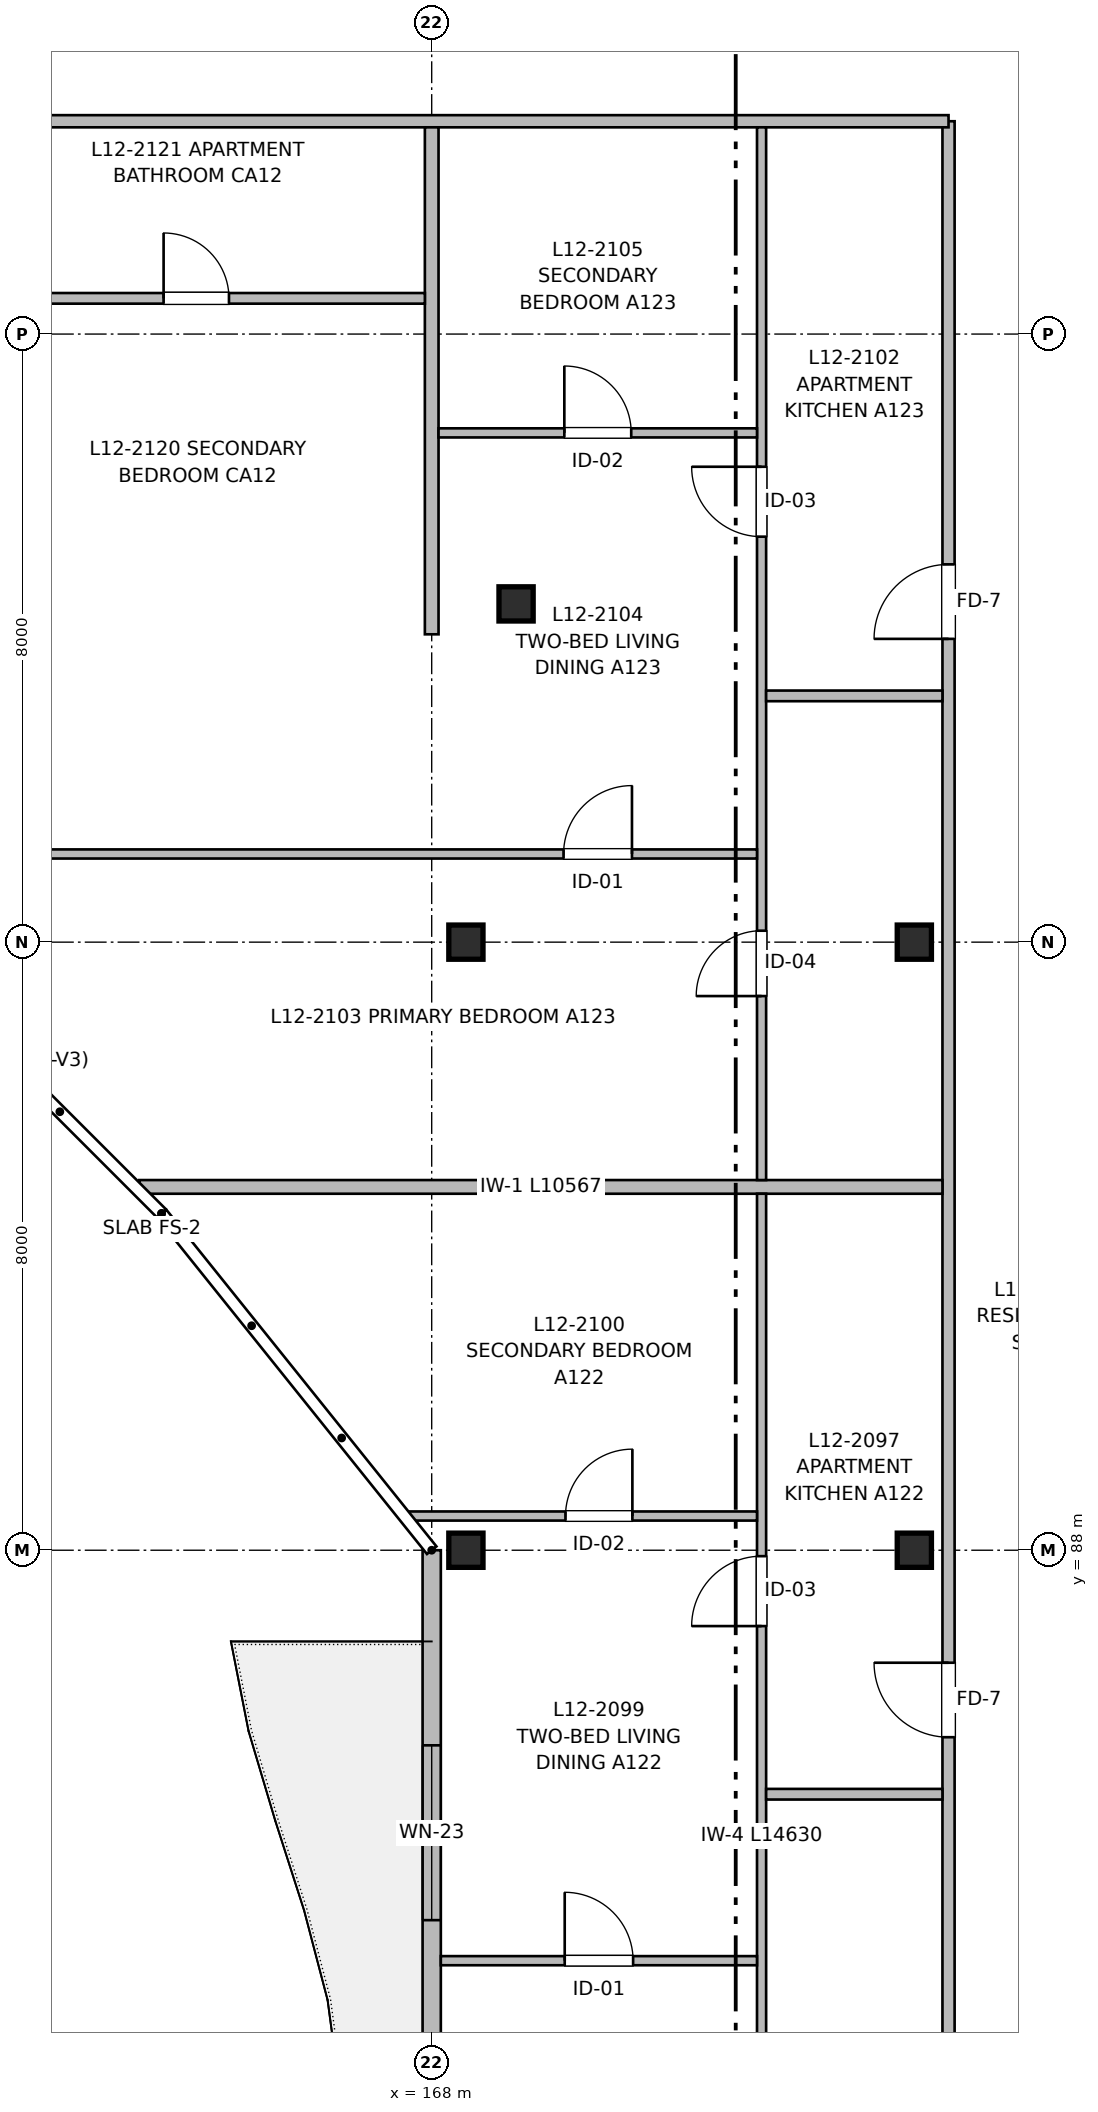
"""IFC4 building model, lengths in metres.
Left out: names, types, materials, properties, quantities, classifications, styles, units other than length and angle.
Written with IfcOpenShell. Run it as: python <this file> out.ifc"""

import sys

from ifc_helpers import new_model, si_unit, direction, frame, frame_2d, origin, origin_2d, place, context, subcontext, project, spatial, rectangle, extrude, element, fill, save


model = new_model("IFC4")
c1 = context("Model", 3, precision=1e-05, world=origin(), true_north=direction((0.0, 1.0)))
c2 = subcontext(c1, "Body", "Model", "MODEL_VIEW")
j1 = project(units=[si_unit("LENGTHUNIT", "METRE"), si_unit("PLANEANGLEUNIT", "RADIAN")], contexts=[c1])
p1 = place(None, origin())
s1 = spatial("IfcSite", under=j1, at=p1, CompositionType="ELEMENT")
p2 = place(p1, origin())
s2 = spatial("IfcBuilding", under=s1, at=p2, CompositionType="ELEMENT")
p3 = place(p2, frame((0.0, 0.0, 39.36)))
s3 = spatial("IfcBuildingStorey", under=s2, at=p3, CompositionType="ELEMENT", Elevation=39.36)
for number, where, z_axis, x_axis in (
    (1, (168.45, 88.0, 0.0), (0.0, 0.0, 1.0), (1.0, 0.0, 0.0)),
    (2, (168.45, 96.0, 0.0), (0.0, 0.0, 1.0), (1.0, 0.0, 0.0)),
    (3, (169.11, 100.45, 0.0), (0.0, 0.0, 1.0), (1.0, 0.0, 0.0)),
    (4, (174.35, 88.0, 0.0), (0.0, 0.0, 1.0), (1.0, 0.0, 0.0)),
    (5, (174.35, 96.0, 0.0), (0.0, 0.0, 1.0), (1.0, 0.0, 0.0)),
):
    element("IfcColumn", number, at=place(p3, frame(where, z_axis=z_axis, x_axis=x_axis)), inside=s3, PredefinedType="COLUMN", context=c2, shape_type="SweptSolid", body=[
        extrude(rectangle(XDim=0.45, YDim=0.45, at=origin_2d()), origin(), (0.0, 0.0, 1.0), 3.2),
    ])
p4 = place(p3, frame((168.0, 63.0, 0.0), z_axis=(0.0, 0.0, 1.0), x_axis=(0.0, 1.0, 0.0)))
e6 = element("IfcWall", 6, at=p4, inside=s3, PredefinedType="SOLIDWALL", context=c2, shape_type="SweptSolid", body=[
    extrude(rectangle(XDim=25.0, YDim=0.24, at=frame_2d((12.5, 0.0))), origin(), (0.0, 0.0, 1.0), 2.98),
])
p5 = place(p4, frame((3.567, 0.0, 0.0)))
e7 = element("IfcOpeningElement", 7, at=p5, cuts=e6, PredefinedType="OPENING", context=c2, shape_type="SweptSolid", body=[
    extrude(rectangle(XDim=1.2, YDim=2.2, at=frame_2d((0.6, 1.1))), frame((0.0, 0.13, 0.0), z_axis=(0.0, -1.0, 0.0), x_axis=(1.0, 0.0, 0.0)), (0.0, 0.0, 1.0), 0.26),
])
p6 = place(p4, frame((5.467, 0.0, 0.72)))
e8 = element("IfcOpeningElement", 8, at=p6, cuts=e6, PredefinedType="OPENING", context=c2, shape_type="SweptSolid", body=[
    extrude(rectangle(XDim=2.25, YDim=1.5, at=frame_2d((1.125, 0.75))), frame((0.0, 0.13, 0.0), z_axis=(0.0, -1.0, 0.0), x_axis=(1.0, 0.0, 0.0)), (0.0, 0.0, 1.0), 0.26),
])
p7 = place(p4, frame((11.65, 0.0, 0.72)))
e9 = element("IfcOpeningElement", 9, at=p7, cuts=e6, PredefinedType="OPENING", context=c2, shape_type="SweptSolid", body=[
    extrude(rectangle(XDim=1.7, YDim=1.5, at=frame_2d((0.85, 0.75))), frame((0.0, 0.13, 0.0), z_axis=(0.0, -1.0, 0.0), x_axis=(1.0, 0.0, 0.0)), (0.0, 0.0, 1.0), 0.26),
])
p8 = place(p4, frame((20.133, 0.0, 0.57)))
e10 = element("IfcOpeningElement", 10, at=p8, cuts=e6, PredefinedType="OPENING", context=c2, shape_type="SweptSolid", body=[
    extrude(rectangle(XDim=2.3, YDim=1.65, at=frame_2d((1.15, 0.825))), frame((0.0, 0.13, 0.0), z_axis=(0.0, -1.0, 0.0), x_axis=(1.0, 0.0, 0.0)), (0.0, 0.0, 1.0), 0.26),
])
p9 = place(p4, frame((16.555, 0.0, 0.82)))
e11 = element("IfcOpeningElement", 11, at=p9, cuts=e6, PredefinedType="OPENING", context=c2, shape_type="SweptSolid", body=[
    extrude(rectangle(XDim=1.5, YDim=1.4, at=frame_2d((0.75, 0.7))), frame((0.0, 0.13, 0.0), z_axis=(0.0, -1.0, 0.0), x_axis=(1.0, 0.0, 0.0)), (0.0, 0.0, 1.0), 0.26),
])
p10 = place(p3, frame((174.8, 63.16, 0.0), z_axis=(0.0, 0.0, 1.0), x_axis=(0.0, 1.0, 0.0)))
e12 = element("IfcWall", 12, at=p10, inside=s3, PredefinedType="PARTITIONING", context=c2, shape_type="SweptSolid", body=[
    extrude(rectangle(XDim=43.64, YDim=0.16, at=frame_2d((21.82, 0.0))), origin(), (0.0, 0.0, 1.0), 2.935),
])
p11 = place(p10, frame((6.61, 0.0, 0.0)))
e13 = element("IfcOpeningElement", 13, at=p11, cuts=e12, PredefinedType="OPENING", context=c2, shape_type="SweptSolid", body=[
    extrude(rectangle(XDim=1.5, YDim=2.2, at=frame_2d((0.75, 1.1))), frame((0.0, 0.09, 0.0), z_axis=(0.0, -1.0, 0.0), x_axis=(1.0, 0.0, 0.0)), (0.0, 0.0, 1.0), 0.18),
])
p12 = place(p10, frame((22.38, 0.0, 0.0)))
e14 = element("IfcOpeningElement", 14, at=p12, cuts=e12, PredefinedType="OPENING", context=c2, shape_type="SweptSolid", body=[
    extrude(rectangle(XDim=0.98, YDim=2.15, at=frame_2d((0.49, 1.075))), frame((0.0, 0.09, 0.0), z_axis=(0.0, -1.0, 0.0), x_axis=(1.0, 0.0, 0.0)), (0.0, 0.0, 1.0), 0.18),
])
p13 = place(p10, frame((36.83, 0.0, 0.0)))
e15 = element("IfcOpeningElement", 15, at=p13, cuts=e12, PredefinedType="OPENING", context=c2, shape_type="SweptSolid", body=[
    extrude(rectangle(XDim=0.98, YDim=2.15, at=frame_2d((0.49, 1.075))), frame((0.0, 0.09, 0.0), z_axis=(0.0, -1.0, 0.0), x_axis=(1.0, 0.0, 0.0)), (0.0, 0.0, 1.0), 0.18),
])
p14 = place(p3, frame((147.16, 106.8, 0.0), z_axis=(0.0, 0.0, 1.0), x_axis=(1.0, 0.0, 0.0)))
e16 = element("IfcWall", 16, at=p14, inside=s3, PredefinedType="PARTITIONING", context=c2, shape_type="SweptSolid", body=[
    extrude(rectangle(XDim=27.64, YDim=0.16, at=frame_2d((13.82, 0.0))), origin(), (0.0, 0.0, 1.0), 2.935),
])
p15 = place(p14, frame((3.515, 0.0, 0.0)))
e17 = element("IfcOpeningElement", 17, at=p15, cuts=e16, PredefinedType="OPENING", context=c2, shape_type="SweptSolid", body=[
    extrude(rectangle(XDim=1.05, YDim=2.15, at=frame_2d((0.525, 1.075))), frame((0.0, 0.09, 0.0), z_axis=(0.0, -1.0, 0.0), x_axis=(1.0, 0.0, 0.0)), (0.0, 0.0, 1.0), 0.18),
])
p16 = place(p14, frame((10.69, 0.0, 0.0)))
e18 = element("IfcOpeningElement", 18, at=p16, cuts=e16, PredefinedType="OPENING", context=c2, shape_type="SweptSolid", body=[
    extrude(rectangle(XDim=0.98, YDim=2.15, at=frame_2d((0.49, 1.075))), frame((0.0, 0.09, 0.0), z_axis=(0.0, -1.0, 0.0), x_axis=(1.0, 0.0, 0.0)), (0.0, 0.0, 1.0), 0.18),
])
p17 = place(p3, frame((168.0, 100.05, 0.0), z_axis=(0.0, 0.0, 1.0), x_axis=(0.0, 1.0, 0.0)))
e19 = element("IfcWall", 19, at=p17, inside=s3, PredefinedType="PARTITIONING", context=c2, shape_type="SweptSolid", body=[
    extrude(rectangle(XDim=6.67, YDim=0.18, at=frame_2d((3.335, 0.0))), origin(), (0.0, 0.0, 1.0), 2.935),
])
p18 = place(p3, frame((164.153, 92.78, 0.0), z_axis=(0.0, 0.0, 1.0), x_axis=(1.0, 0.0, 0.0)))
e20 = element("IfcWall", 20, at=p18, inside=s3, PredefinedType="PARTITIONING", context=c2, shape_type="SweptSolid", body=[
    extrude(rectangle(XDim=10.567, YDim=0.18, at=frame_2d((5.284, 0.0))), origin(), (0.0, 0.0, 1.0), 2.935),
])
p19 = place(p3, frame((172.34, 78.06, 0.0), z_axis=(0.0, 0.0, 1.0), x_axis=(0.0, 1.0, 0.0)))
e21 = element("IfcWall", 21, at=p19, inside=s3, PredefinedType="PARTITIONING", context=c2, shape_type="SweptSolid", body=[
    extrude(rectangle(XDim=14.63, YDim=0.12, at=frame_2d((7.315, 0.0))), origin(), (0.0, 0.0, 1.0), 2.935),
])
p20 = place(p19, frame((2.557, 0.0, 0.0)))
e22 = element("IfcOpeningElement", 22, at=p20, cuts=e21, PredefinedType="OPENING", context=c2, shape_type="SweptSolid", body=[
    extrude(rectangle(XDim=0.86, YDim=2.1, at=frame_2d((0.43, 1.05))), frame((0.0, 0.07, 0.0), z_axis=(0.0, -1.0, 0.0), x_axis=(1.0, 0.0, 0.0)), (0.0, 0.0, 1.0), 0.14),
])
p21 = place(p19, frame((8.942, 0.0, 0.0)))
e23 = element("IfcOpeningElement", 23, at=p21, cuts=e21, PredefinedType="OPENING", context=c2, shape_type="SweptSolid", body=[
    extrude(rectangle(XDim=0.92, YDim=2.1, at=frame_2d((0.46, 1.05))), frame((0.0, 0.07, 0.0), z_axis=(0.0, -1.0, 0.0), x_axis=(1.0, 0.0, 0.0)), (0.0, 0.0, 1.0), 0.14),
])
p22 = place(p3, frame((172.4, 84.79, 0.0), z_axis=(0.0, 0.0, 1.0), x_axis=(1.0, 0.0, 0.0)))
e24 = element("IfcWall", 24, at=p22, inside=s3, PredefinedType="PARTITIONING", context=c2, shape_type="SweptSolid", body=[
    extrude(rectangle(XDim=2.32, YDim=0.14, at=frame_2d((1.16, 0.0))), origin(), (0.0, 0.0, 1.0), 2.935),
])
p23 = place(p3, frame((168.12, 82.6, 0.0), z_axis=(0.0, 0.0, 1.0), x_axis=(1.0, 0.0, 0.0)))
e25 = element("IfcWall", 25, at=p23, inside=s3, PredefinedType="PARTITIONING", context=c2, shape_type="SweptSolid", body=[
    extrude(rectangle(XDim=4.16, YDim=0.12, at=frame_2d((2.08, 0.0))), origin(), (0.0, 0.0, 1.0), 2.935),
])
p24 = place(p23, frame((1.63, 0.0, 0.0)))
e26 = element("IfcOpeningElement", 26, at=p24, cuts=e25, PredefinedType="OPENING", context=c2, shape_type="SweptSolid", body=[
    extrude(rectangle(XDim=0.9, YDim=2.1, at=frame_2d((0.45, 1.05))), frame((0.0, 0.07, 0.0), z_axis=(0.0, -1.0, 0.0), x_axis=(1.0, 0.0, 0.0)), (0.0, 0.0, 1.0), 0.14),
])
p25 = place(p3, frame((167.69, 88.45, 0.0), z_axis=(0.0, 0.0, 1.0), x_axis=(1.0, 0.0, 0.0)))
e27 = element("IfcWall", 27, at=p25, inside=s3, PredefinedType="PARTITIONING", context=c2, shape_type="SweptSolid", body=[
    extrude(rectangle(XDim=4.59, YDim=0.12, at=frame_2d((2.295, 0.0))), origin(), (0.0, 0.0, 1.0), 2.935),
])
p26 = place(p25, frame((2.07, 0.0, 0.0)))
e28 = element("IfcOpeningElement", 28, at=p26, cuts=e27, PredefinedType="OPENING", context=c2, shape_type="SweptSolid", body=[
    extrude(rectangle(XDim=0.88, YDim=2.1, at=frame_2d((0.44, 1.05))), frame((0.0, 0.07, 0.0), z_axis=(0.0, -1.0, 0.0), x_axis=(1.0, 0.0, 0.0)), (0.0, 0.0, 1.0), 0.14),
])
p27 = place(p3, frame((172.34, 92.87, 0.0), z_axis=(0.0, 0.0, 1.0), x_axis=(0.0, 1.0, 0.0)))
e29 = element("IfcWall", 29, at=p27, inside=s3, PredefinedType="PARTITIONING", context=c2, shape_type="SweptSolid", body=[
    extrude(rectangle(XDim=13.85, YDim=0.12, at=frame_2d((6.925, 0.0))), origin(), (0.0, 0.0, 1.0), 2.935),
])
p28 = place(p27, frame((2.421, 0.0, 0.0)))
e30 = element("IfcOpeningElement", 30, at=p28, cuts=e29, PredefinedType="OPENING", context=c2, shape_type="SweptSolid", body=[
    extrude(rectangle(XDim=0.86, YDim=2.1, at=frame_2d((0.43, 1.05))), frame((0.0, 0.07, 0.0), z_axis=(0.0, -1.0, 0.0), x_axis=(1.0, 0.0, 0.0)), (0.0, 0.0, 1.0), 0.14),
])
p29 = place(p27, frame((8.464, 0.0, 0.0)))
e31 = element("IfcOpeningElement", 31, at=p29, cuts=e29, PredefinedType="OPENING", context=c2, shape_type="SweptSolid", body=[
    extrude(rectangle(XDim=0.92, YDim=2.1, at=frame_2d((0.46, 1.05))), frame((0.0, 0.07, 0.0), z_axis=(0.0, -1.0, 0.0), x_axis=(1.0, 0.0, 0.0)), (0.0, 0.0, 1.0), 0.14),
])
p30 = place(p3, frame((172.4, 99.24, 0.0), z_axis=(0.0, 0.0, 1.0), x_axis=(1.0, 0.0, 0.0)))
e32 = element("IfcWall", 32, at=p30, inside=s3, PredefinedType="PARTITIONING", context=c2, shape_type="SweptSolid", body=[
    extrude(rectangle(XDim=2.32, YDim=0.14, at=frame_2d((1.16, 0.0))), origin(), (0.0, 0.0, 1.0), 2.935),
])
p31 = place(p3, frame((159.604, 97.16, 0.0), z_axis=(0.0, 0.0, 1.0), x_axis=(1.0, 0.0, 0.0)))
e33 = element("IfcWall", 33, at=p31, inside=s3, PredefinedType="PARTITIONING", context=c2, shape_type="SweptSolid", body=[
    extrude(rectangle(XDim=12.676, YDim=0.12, at=frame_2d((6.338, 0.0))), origin(), (0.0, 0.0, 1.0), 2.935),
])
p32 = place(p31, frame((10.131, 0.0, 0.0)))
e34 = element("IfcOpeningElement", 34, at=p32, cuts=e33, PredefinedType="OPENING", context=c2, shape_type="SweptSolid", body=[
    extrude(rectangle(XDim=0.9, YDim=2.1, at=frame_2d((0.45, 1.05))), frame((0.0, 0.07, 0.0), z_axis=(0.0, -1.0, 0.0), x_axis=(1.0, 0.0, 0.0)), (0.0, 0.0, 1.0), 0.14),
])
p33 = place(p3, frame((168.09, 102.7, 0.0), z_axis=(0.0, 0.0, 1.0), x_axis=(1.0, 0.0, 0.0)))
e35 = element("IfcWall", 35, at=p33, inside=s3, PredefinedType="PARTITIONING", context=c2, shape_type="SweptSolid", body=[
    extrude(rectangle(XDim=4.19, YDim=0.12, at=frame_2d((2.095, 0.0))), origin(), (0.0, 0.0, 1.0), 2.935),
])
p34 = place(p33, frame((1.655, 0.0, 0.0)))
e36 = element("IfcOpeningElement", 36, at=p34, cuts=e35, PredefinedType="OPENING", context=c2, shape_type="SweptSolid", body=[
    extrude(rectangle(XDim=0.88, YDim=2.1, at=frame_2d((0.44, 1.05))), frame((0.0, 0.07, 0.0), z_axis=(0.0, -1.0, 0.0), x_axis=(1.0, 0.0, 0.0)), (0.0, 0.0, 1.0), 0.14),
])
p35 = place(p3, frame((161.94, 104.47, 0.0), z_axis=(0.0, 0.0, 1.0), x_axis=(1.0, 0.0, 0.0)))
e37 = element("IfcWall", 37, at=p35, inside=s3, PredefinedType="PARTITIONING", context=c2, shape_type="SweptSolid", body=[
    extrude(rectangle(XDim=5.97, YDim=0.14, at=frame_2d((2.985, 0.0))), origin(), (0.0, 0.0, 1.0), 2.935),
])
p36 = place(p35, frame((2.533, 0.0, 0.0)))
e38 = element("IfcOpeningElement", 38, at=p36, cuts=e37, PredefinedType="OPENING", context=c2, shape_type="SweptSolid", body=[
    extrude(rectangle(XDim=0.86, YDim=2.1, at=frame_2d((0.43, 1.05))), frame((0.0, 0.08, 0.0), z_axis=(0.0, -1.0, 0.0), x_axis=(1.0, 0.0, 0.0)), (0.0, 0.0, 1.0), 0.16),
])
p37 = place(p8, origin())
e39 = element("IfcWindow", 39, at=p37, inside=s3, PartitioningType="SINGLE_PANEL", PredefinedType="WINDOW", context=c2, shape_type="SweptSolid", body=[
    extrude(rectangle(XDim=2.3, YDim=1.65, at=frame_2d((1.15, 0.825))), frame((0.0, 0.03, 0.0), z_axis=(0.0, -1.0, 0.0), x_axis=(1.0, 0.0, 0.0)), (0.0, 0.0, 1.0), 0.06),
])
fill(e10, e39)
p38 = place(p21, origin())
e40 = element("IfcDoor", 40, at=p38, inside=s3, OperationType="SINGLE_SWING_LEFT", PredefinedType="DOOR", context=c2, shape_type="SweptSolid", body=[
    extrude(rectangle(XDim=0.92, YDim=2.1, at=frame_2d((0.46, 1.05))), frame((0.0, 0.025, 0.0), z_axis=(0.0, -1.0, 0.0), x_axis=(1.0, 0.0, 0.0)), (0.0, 0.0, 1.0), 0.05),
])
fill(e23, e40)
p39 = place(p12, origin())
e41 = element("IfcDoor", 41, at=p39, inside=s3, OperationType="SINGLE_SWING_RIGHT", PredefinedType="DOOR", context=c2, shape_type="SweptSolid", body=[
    extrude(rectangle(XDim=0.98, YDim=2.15, at=frame_2d((0.49, 1.075))), frame((0.0, 0.025, 0.0), z_axis=(0.0, -1.0, 0.0), x_axis=(1.0, 0.0, 0.0)), (0.0, 0.0, 1.0), 0.05),
])
fill(e14, e41)
p40 = place(p24, origin())
e42 = element("IfcDoor", 42, at=p40, inside=s3, OperationType="SINGLE_SWING_LEFT", PredefinedType="DOOR", context=c2, shape_type="SweptSolid", body=[
    extrude(rectangle(XDim=0.9, YDim=2.1, at=frame_2d((0.45, 1.05))), frame((0.0, 0.025, 0.0), z_axis=(0.0, -1.0, 0.0), x_axis=(1.0, 0.0, 0.0)), (0.0, 0.0, 1.0), 0.05),
])
fill(e26, e42)
p41 = place(p26, origin())
e43 = element("IfcDoor", 43, at=p41, inside=s3, OperationType="SINGLE_SWING_RIGHT", PredefinedType="DOOR", context=c2, shape_type="SweptSolid", body=[
    extrude(rectangle(XDim=0.88, YDim=2.1, at=frame_2d((0.44, 1.05))), frame((0.0, 0.025, 0.0), z_axis=(0.0, -1.0, 0.0), x_axis=(1.0, 0.0, 0.0)), (0.0, 0.0, 1.0), 0.05),
])
fill(e28, e43)
p42 = place(p28, origin())
e44 = element("IfcDoor", 44, at=p42, inside=s3, OperationType="SINGLE_SWING_LEFT", PredefinedType="DOOR", context=c2, shape_type="SweptSolid", body=[
    extrude(rectangle(XDim=0.86, YDim=2.1, at=frame_2d((0.43, 1.05))), frame((0.0, 0.025, 0.0), z_axis=(0.0, -1.0, 0.0), x_axis=(1.0, 0.0, 0.0)), (0.0, 0.0, 1.0), 0.05),
])
fill(e30, e44)
p43 = place(p29, origin())
e45 = element("IfcDoor", 45, at=p43, inside=s3, OperationType="SINGLE_SWING_RIGHT", PredefinedType="DOOR", context=c2, shape_type="SweptSolid", body=[
    extrude(rectangle(XDim=0.92, YDim=2.1, at=frame_2d((0.46, 1.05))), frame((0.0, 0.025, 0.0), z_axis=(0.0, -1.0, 0.0), x_axis=(1.0, 0.0, 0.0)), (0.0, 0.0, 1.0), 0.05),
])
fill(e31, e45)
p44 = place(p13, origin())
e46 = element("IfcDoor", 46, at=p44, inside=s3, OperationType="SINGLE_SWING_LEFT", PredefinedType="DOOR", context=c2, shape_type="SweptSolid", body=[
    extrude(rectangle(XDim=0.98, YDim=2.15, at=frame_2d((0.49, 1.075))), frame((0.0, 0.025, 0.0), z_axis=(0.0, -1.0, 0.0), x_axis=(1.0, 0.0, 0.0)), (0.0, 0.0, 1.0), 0.05),
])
fill(e15, e46)
p45 = place(p32, origin())
e47 = element("IfcDoor", 47, at=p45, inside=s3, OperationType="SINGLE_SWING_RIGHT", PredefinedType="DOOR", context=c2, shape_type="SweptSolid", body=[
    extrude(rectangle(XDim=0.9, YDim=2.1, at=frame_2d((0.45, 1.05))), frame((0.0, 0.025, 0.0), z_axis=(0.0, -1.0, 0.0), x_axis=(1.0, 0.0, 0.0)), (0.0, 0.0, 1.0), 0.05),
])
fill(e34, e47)
p46 = place(p34, origin())
e48 = element("IfcDoor", 48, at=p46, inside=s3, OperationType="SINGLE_SWING_LEFT", PredefinedType="DOOR", context=c2, shape_type="SweptSolid", body=[
    extrude(rectangle(XDim=0.88, YDim=2.1, at=frame_2d((0.44, 1.05))), frame((0.0, 0.025, 0.0), z_axis=(0.0, -1.0, 0.0), x_axis=(1.0, 0.0, 0.0)), (0.0, 0.0, 1.0), 0.05),
])
fill(e36, e48)
p47 = place(p36, origin())
e49 = element("IfcDoor", 49, at=p47, inside=s3, OperationType="SINGLE_SWING_LEFT", PredefinedType="DOOR", context=c2, shape_type="SweptSolid", body=[
    extrude(rectangle(XDim=0.86, YDim=2.1, at=frame_2d((0.43, 1.05))), frame((0.0, 0.025, 0.0), z_axis=(0.0, -1.0, 0.0), x_axis=(1.0, 0.0, 0.0)), (0.0, 0.0, 1.0), 0.05),
])
fill(e38, e49)
save(model, sys.argv[1])
